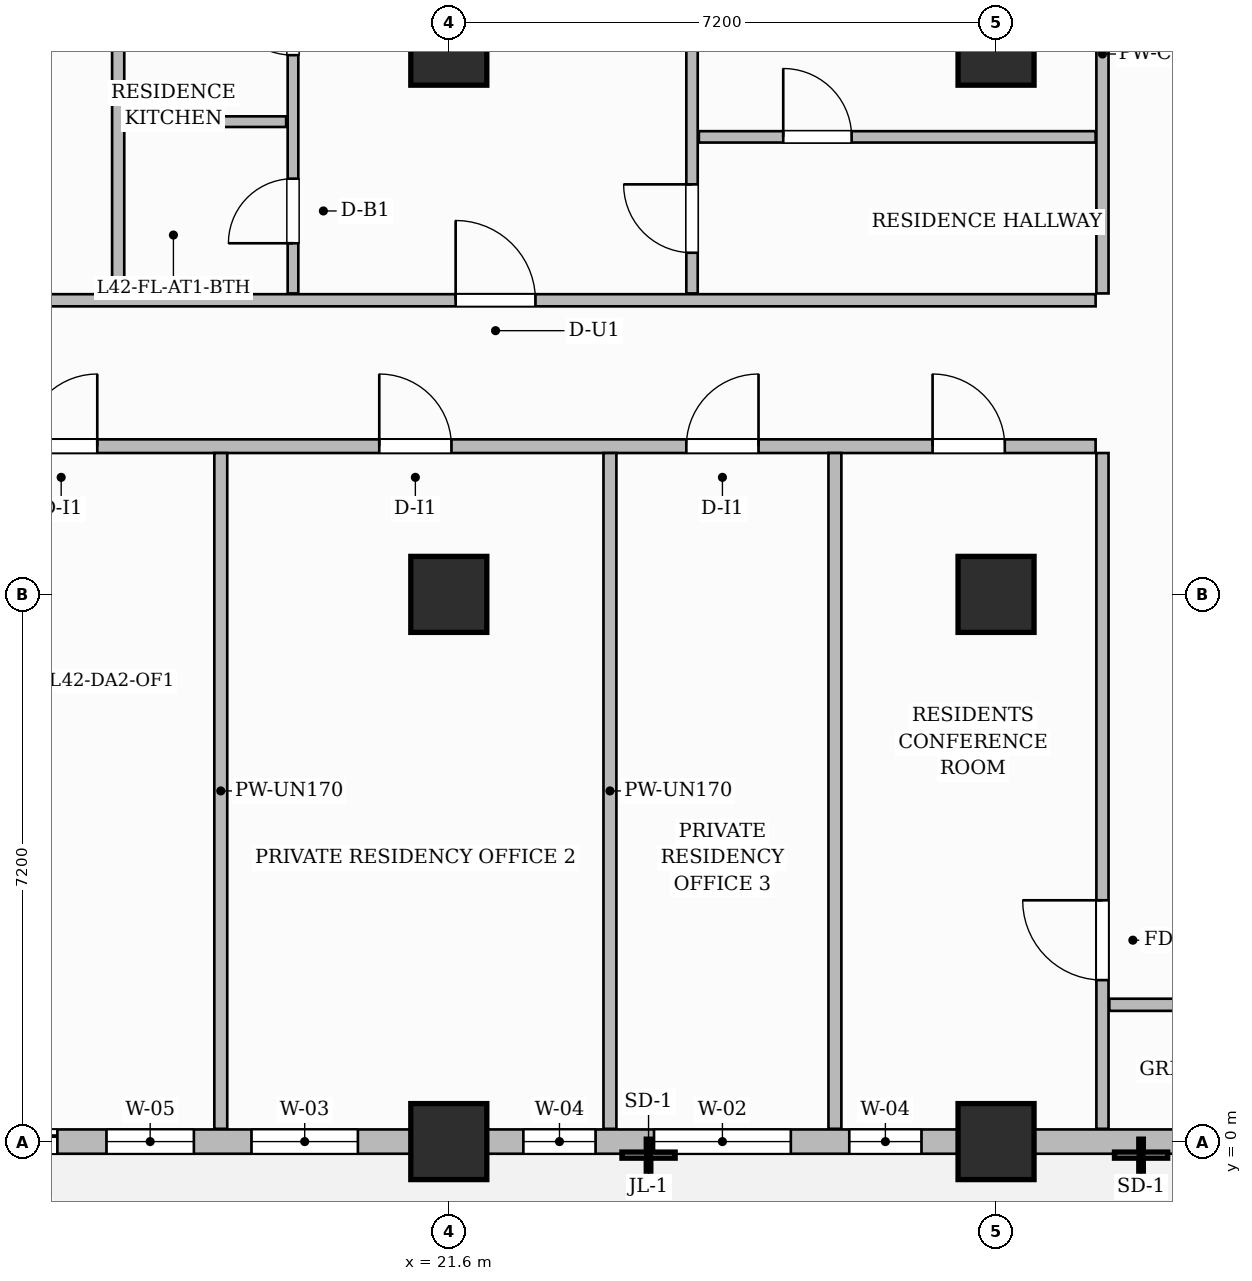
"""IFC4 building model, lengths in metres.
Left out: names, types, materials, properties, quantities, classifications, styles, units other than length and angle.
Written with IfcOpenShell. Run it as: python <this file> out.ifc"""

import sys

from ifc_helpers import new_model, si_unit, direction, frame, frame_2d, origin, origin_2d, place, context, subcontext, project, spatial, rectangle, extrude, source, transform, mapped, element, fill, save


model = new_model("IFC4")
c1 = context("Model", 3, precision=1e-05, world=origin(), true_north=direction((0.0, 1.0)))
c2 = subcontext(c1, "Body", "Model", "MODEL_VIEW")
j1 = project(units=[si_unit("LENGTHUNIT", "METRE"), si_unit("PLANEANGLEUNIT", "RADIAN")], contexts=[c1])
p1 = place(None, origin())
s1 = spatial("IfcSite", under=j1, at=p1, CompositionType="ELEMENT")
p2 = place(p1, origin())
s2 = spatial("IfcBuilding", under=s1, at=p2, CompositionType="ELEMENT")
p3 = place(p2, frame((0.0, 0.0, 169.55)))
s3 = spatial("IfcBuildingStorey", under=s2, at=p3, CompositionType="ELEMENT", Elevation=169.55)
m1 = source(origin(), c2, "Body", "SweptSolid", [
    extrude(rectangle(XDim=1.0, YDim=1.0, at=origin_2d()), origin(), (0.0, 0.0, 1.0), 3.85),
])
for number, where, z_axis, x_axis in (
    (1, (21.6, 0.0, 0.0), (0.0, 0.0, 1.0), (1.0, 0.0, 0.0)),
    (2, (21.6, 7.2, 0.0), (0.0, 0.0, 1.0), (1.0, 0.0, 0.0)),
    (3, (21.6, 14.4, 0.0), (0.0, 0.0, 1.0), (1.0, 0.0, 0.0)),
    (4, (28.8, 0.0, 0.0), (0.0, 0.0, 1.0), (1.0, 0.0, 0.0)),
    (5, (28.8, 7.2, 0.0), (0.0, 0.0, 1.0), (1.0, 0.0, 0.0)),
    (6, (28.8, 14.4, 0.0), (0.0, 0.0, 1.0), (1.0, 0.0, 0.0)),
):
    element("IfcColumn", number, at=place(p3, frame(where, z_axis=z_axis, x_axis=x_axis)), inside=s3, PredefinedType="COLUMN", context=c2, shape_type="MappedRepresentation", body=[
        mapped(m1, transform((0.0, 0.0, 0.0), scale=1.0)),
    ])
p4 = place(p3, frame((14.568, 9.15, 0.0), z_axis=(0.0, 0.0, 1.0), x_axis=(1.0, 0.0, 0.0)))
e7 = element("IfcWall", 7, at=p4, inside=s3, PredefinedType="PARTITIONING", context=c2, shape_type="SweptSolid", body=[
    extrude(rectangle(XDim=15.542, YDim=0.18, at=frame_2d((7.771, 0.0))), origin(), (0.0, 0.0, 1.0), 3.6),
])
p5 = place(p4, frame((1.457, 0.0, 0.0)))
e8 = element("IfcOpeningElement", 8, at=p5, cuts=e7, PredefinedType="OPENING", context=c2, shape_type="SweptSolid", body=[
    extrude(rectangle(XDim=0.95, YDim=2.15, at=frame_2d((0.475, 1.075))), frame((0.0, 0.1, 0.0), z_axis=(0.0, -1.0, 0.0), x_axis=(1.0, 0.0, 0.0)), (0.0, 0.0, 1.0), 0.2),
])
p6 = place(p4, frame((6.117, 0.0, 0.0)))
e9 = element("IfcOpeningElement", 9, at=p6, cuts=e7, PredefinedType="OPENING", context=c2, shape_type="SweptSolid", body=[
    extrude(rectangle(XDim=0.95, YDim=2.15, at=frame_2d((0.475, 1.075))), frame((0.0, 0.1, 0.0), z_axis=(0.0, -1.0, 0.0), x_axis=(1.0, 0.0, 0.0)), (0.0, 0.0, 1.0), 0.2),
])
p7 = place(p4, frame((10.157, 0.0, 0.0)))
e10 = element("IfcOpeningElement", 10, at=p7, cuts=e7, PredefinedType="OPENING", context=c2, shape_type="SweptSolid", body=[
    extrude(rectangle(XDim=0.95, YDim=2.15, at=frame_2d((0.475, 1.075))), frame((0.0, 0.1, 0.0), z_axis=(0.0, -1.0, 0.0), x_axis=(1.0, 0.0, 0.0)), (0.0, 0.0, 1.0), 0.2),
])
p8 = place(p4, frame((13.397, 0.0, 0.0)))
e11 = element("IfcOpeningElement", 11, at=p8, cuts=e7, PredefinedType="OPENING", context=c2, shape_type="SweptSolid", body=[
    extrude(rectangle(XDim=0.95, YDim=2.15, at=frame_2d((0.475, 1.075))), frame((0.0, 0.1, 0.0), z_axis=(0.0, -1.0, 0.0), x_axis=(1.0, 0.0, 0.0)), (0.0, 0.0, 1.0), 0.2),
])
p9 = place(p3, frame((14.568, 11.07, 0.0), z_axis=(0.0, 0.0, 1.0), x_axis=(1.0, 0.0, 0.0)))
e12 = element("IfcWall", 12, at=p9, inside=s3, PredefinedType="PARTITIONING", context=c2, shape_type="SweptSolid", body=[
    extrude(rectangle(XDim=15.542, YDim=0.16, at=frame_2d((7.771, 0.0))), origin(), (0.0, 0.0, 1.0), 3.6),
])
p10 = place(p9, frame((7.122, 0.0, 0.0)))
e13 = element("IfcOpeningElement", 13, at=p10, cuts=e12, PredefinedType="OPENING", context=c2, shape_type="SweptSolid", body=[
    extrude(rectangle(XDim=1.05, YDim=2.25, at=frame_2d((0.525, 1.125))), frame((0.0, 0.09, 0.0), z_axis=(0.0, -1.0, 0.0), x_axis=(1.0, 0.0, 0.0)), (0.0, 0.0, 1.0), 0.18),
])
p11 = place(p3, frame((30.2, 11.16, 0.0), z_axis=(0.0, 0.0, 1.0), x_axis=(0.0, 1.0, 0.0)))
e14 = element("IfcWall", 14, at=p11, inside=s3, PredefinedType="PARTITIONING", context=c2, shape_type="SweptSolid", body=[
    extrude(rectangle(XDim=6.3, YDim=0.16, at=frame_2d((3.15, 0.0))), origin(), (0.0, 0.0, 1.0), 3.6),
])
p12 = place(p3, frame((30.2, 0.168, 0.0), z_axis=(0.0, 0.0, 1.0), x_axis=(0.0, 1.0, 0.0)))
e15 = element("IfcWall", 15, at=p12, inside=s3, PredefinedType="PARTITIONING", context=c2, shape_type="SweptSolid", body=[
    extrude(rectangle(XDim=8.892, YDim=0.16, at=frame_2d((4.446, 0.0))), origin(), (0.0, 0.0, 1.0), 3.6),
])
p13 = place(p12, frame((1.957, 0.0, 0.0)))
e16 = element("IfcOpeningElement", 16, at=p13, cuts=e15, PredefinedType="OPENING", context=c2, shape_type="SweptSolid", body=[
    extrude(rectangle(XDim=1.05, YDim=2.15, at=frame_2d((0.525, 1.075))), frame((0.0, 0.09, 0.0), z_axis=(0.0, -1.0, 0.0), x_axis=(1.0, 0.0, 0.0)), (0.0, 0.0, 1.0), 0.18),
])
p14 = place(p3, frame((30.29, 1.8, 0.0), z_axis=(0.0, 0.0, 1.0), x_axis=(1.0, 0.0, 0.0)))
e17 = element("IfcWall", 17, at=p14, inside=s3, PredefinedType="PARTITIONING", context=c2, shape_type="SweptSolid", body=[
    extrude(rectangle(XDim=19.37, YDim=0.16, at=frame_2d((9.685, 0.0))), origin(), (0.0, 0.0, 1.0), 3.6),
])
p15 = place(p14, frame((2.916, 0.0, 0.0)))
e18 = element("IfcOpeningElement", 18, at=p15, cuts=e17, PredefinedType="OPENING", context=c2, shape_type="SweptSolid", body=[
    extrude(rectangle(XDim=0.9, YDim=2.15, at=frame_2d((0.45, 1.075))), frame((0.0, 0.09, 0.0), z_axis=(0.0, -1.0, 0.0), x_axis=(1.0, 0.0, 0.0)), (0.0, 0.0, 1.0), 0.18),
])
p16 = place(p14, frame((9.66, 0.0, 0.0)))
e19 = element("IfcOpeningElement", 19, at=p16, cuts=e17, PredefinedType="OPENING", context=c2, shape_type="SweptSolid", body=[
    extrude(rectangle(XDim=0.9, YDim=2.15, at=frame_2d((0.45, 1.075))), frame((0.0, 0.09, 0.0), z_axis=(0.0, -1.0, 0.0), x_axis=(1.0, 0.0, 0.0)), (0.0, 0.0, 1.0), 0.18),
])
p17 = place(p14, frame((15.86, 0.0, 0.0)))
e20 = element("IfcOpeningElement", 20, at=p17, cuts=e17, PredefinedType="OPENING", context=c2, shape_type="SweptSolid", body=[
    extrude(rectangle(XDim=0.9, YDim=2.15, at=frame_2d((0.45, 1.075))), frame((0.0, 0.09, 0.0), z_axis=(0.0, -1.0, 0.0), x_axis=(1.0, 0.0, 0.0)), (0.0, 0.0, 1.0), 0.18),
])
for number, where, z_axis, x_axis in (
    (21, (18.6, 0.168, 0.0), (0.0, 0.0, 1.0), (0.0, 1.0, 0.0)),
    (22, (23.72, 0.168, 0.0), (0.0, 0.0, 1.0), (0.0, 1.0, 0.0)),
    (23, (26.68, 0.168, 0.0), (0.0, 0.0, 1.0), (0.0, 1.0, 0.0)),
):
    element("IfcWall", number, at=place(p3, frame(where, z_axis=z_axis, x_axis=x_axis)), inside=s3, PredefinedType="PARTITIONING", context=c2, shape_type="SweptSolid", body=[
        extrude(rectangle(XDim=8.892, YDim=0.17, at=frame_2d((4.446, 0.0))), origin(), (0.0, 0.0, 1.0), 3.6),
    ])
p18 = place(p3, frame((17.25, 11.16, 0.0), z_axis=(0.0, 0.0, 1.0), x_axis=(0.0, 1.0, 0.0)))
e24 = element("IfcWall", 24, at=p18, inside=s3, PredefinedType="PARTITIONING", context=c2, shape_type="SweptSolid", body=[
    extrude(rectangle(XDim=13.95, YDim=0.16, at=frame_2d((6.975, 0.0))), origin(), (0.0, 0.0, 1.0), 3.6),
])
p19 = place(p3, frame((19.55, 11.16, 0.0), z_axis=(0.0, 0.0, 1.0), x_axis=(0.0, 1.0, 0.0)))
e25 = element("IfcWall", 25, at=p19, inside=s3, PredefinedType="PARTITIONING", context=c2, shape_type="SweptSolid", body=[
    extrude(rectangle(XDim=4.82, YDim=0.14, at=frame_2d((2.41, 0.0))), origin(), (0.0, 0.0, 1.0), 3.6),
])
p20 = place(p19, frame((0.66, 0.0, 0.0)))
e26 = element("IfcOpeningElement", 26, at=p20, cuts=e25, PredefinedType="OPENING", context=c2, shape_type="SweptSolid", body=[
    extrude(rectangle(XDim=0.85, YDim=2.1, at=frame_2d((0.425, 1.05))), frame((0.0, 0.08, 0.0), z_axis=(0.0, -1.0, 0.0), x_axis=(1.0, 0.0, 0.0)), (0.0, 0.0, 1.0), 0.16),
])
p21 = place(p19, frame((3.135, 0.0, 0.0)))
e27 = element("IfcOpeningElement", 27, at=p21, cuts=e25, PredefinedType="OPENING", context=c2, shape_type="SweptSolid", body=[
    extrude(rectangle(XDim=0.9, YDim=2.15, at=frame_2d((0.45, 1.075))), frame((0.0, 0.08, 0.0), z_axis=(0.0, -1.0, 0.0), x_axis=(1.0, 0.0, 0.0)), (0.0, 0.0, 1.0), 0.16),
])
p22 = place(p3, frame((17.39, 13.42, 0.0), z_axis=(0.0, 0.0, 1.0), x_axis=(1.0, 0.0, 0.0)))
e28 = element("IfcWall", 28, at=p22, inside=s3, PredefinedType="PARTITIONING", context=c2, shape_type="SweptSolid", body=[
    extrude(rectangle(XDim=2.07, YDim=0.14, at=frame_2d((1.035, 0.0))), origin(), (0.0, 0.0, 1.0), 3.6),
])
p23 = place(p3, frame((24.8, 11.16, 0.0), z_axis=(0.0, 0.0, 1.0), x_axis=(0.0, 1.0, 0.0)))
e29 = element("IfcWall", 29, at=p23, inside=s3, PredefinedType="PARTITIONING", context=c2, shape_type="SweptSolid", body=[
    extrude(rectangle(XDim=8.6, YDim=0.15, at=frame_2d((4.3, 0.0))), origin(), (0.0, 0.0, 1.0), 3.6),
])
p24 = place(p23, frame((0.535, 0.0, 0.0)))
e30 = element("IfcOpeningElement", 30, at=p24, cuts=e29, PredefinedType="OPENING", context=c2, shape_type="SweptSolid", body=[
    extrude(rectangle(XDim=0.9, YDim=2.15, at=frame_2d((0.45, 1.075))), frame((0.0, 0.085, 0.0), z_axis=(0.0, -1.0, 0.0), x_axis=(1.0, 0.0, 0.0)), (0.0, 0.0, 1.0), 0.17),
])
p25 = place(p3, frame((24.89, 13.22, 0.0), z_axis=(0.0, 0.0, 1.0), x_axis=(1.0, 0.0, 0.0)))
e31 = element("IfcWall", 31, at=p25, inside=s3, PredefinedType="PARTITIONING", context=c2, shape_type="SweptSolid", body=[
    extrude(rectangle(XDim=5.22, YDim=0.15, at=frame_2d((2.61, 0.0))), origin(), (0.0, 0.0, 1.0), 3.6),
])
p26 = place(p25, frame((1.11, 0.0, 0.0)))
e32 = element("IfcOpeningElement", 32, at=p26, cuts=e31, PredefinedType="OPENING", context=c2, shape_type="SweptSolid", body=[
    extrude(rectangle(XDim=0.9, YDim=2.15, at=frame_2d((0.45, 1.075))), frame((0.0, 0.085, 0.0), z_axis=(0.0, -1.0, 0.0), x_axis=(1.0, 0.0, 0.0)), (0.0, 0.0, 1.0), 0.17),
])
p27 = place(p3, frame((14.4, 0.0, 0.0), z_axis=(0.0, 0.0, 1.0), x_axis=(1.0, 0.0, 0.0)))
e33 = element("IfcWall", 33, at=p27, inside=s3, PredefinedType="SOLIDWALL", context=c2, shape_type="SweptSolid", body=[
    extrude(rectangle(XDim=35.4, YDim=0.32, at=frame_2d((17.7, 0.0))), origin(), (0.0, 0.0, 1.0), 3.085),
])
p28 = place(p27, frame((0.85, 0.0, 0.0)))
e34 = element("IfcOpeningElement", 34, at=p28, cuts=e33, PredefinedType="OPENING", context=c2, shape_type="SweptSolid", body=[
    extrude(rectangle(XDim=1.2, YDim=2.2, at=frame_2d((0.6, 1.1))), frame((0.0, 0.17, 0.0), z_axis=(0.0, -1.0, 0.0), x_axis=(1.0, 0.0, 0.0)), (0.0, 0.0, 1.0), 0.34),
])
p29 = place(p27, frame((2.696, 0.0, 0.8)))
e35 = element("IfcOpeningElement", 35, at=p29, cuts=e33, PredefinedType="OPENING", context=c2, shape_type="SweptSolid", body=[
    extrude(rectangle(XDim=1.15, YDim=1.8, at=frame_2d((0.575, 0.9))), frame((0.0, 0.17, 0.0), z_axis=(0.0, -1.0, 0.0), x_axis=(1.0, 0.0, 0.0)), (0.0, 0.0, 1.0), 0.34),
])
p30 = place(p27, frame((4.604, 0.0, 0.8)))
e36 = element("IfcOpeningElement", 36, at=p30, cuts=e33, PredefinedType="OPENING", context=c2, shape_type="SweptSolid", body=[
    extrude(rectangle(XDim=1.4, YDim=1.85, at=frame_2d((0.7, 0.925))), frame((0.0, 0.17, 0.0), z_axis=(0.0, -1.0, 0.0), x_axis=(1.0, 0.0, 0.0)), (0.0, 0.0, 1.0), 0.34),
])
p31 = place(p27, frame((8.181, 0.0, 0.8)))
e37 = element("IfcOpeningElement", 37, at=p31, cuts=e33, PredefinedType="OPENING", context=c2, shape_type="SweptSolid", body=[
    extrude(rectangle(XDim=0.95, YDim=1.75, at=frame_2d((0.475, 0.875))), frame((0.0, 0.17, 0.0), z_axis=(0.0, -1.0, 0.0), x_axis=(1.0, 0.0, 0.0)), (0.0, 0.0, 1.0), 0.34),
])
p32 = place(p27, frame((9.9, 0.0, 0.8)))
e38 = element("IfcOpeningElement", 38, at=p32, cuts=e33, PredefinedType="OPENING", context=c2, shape_type="SweptSolid", body=[
    extrude(rectangle(XDim=1.8, YDim=1.85, at=frame_2d((0.9, 0.925))), frame((0.0, 0.17, 0.0), z_axis=(0.0, -1.0, 0.0), x_axis=(1.0, 0.0, 0.0)), (0.0, 0.0, 1.0), 0.34),
])
p33 = place(p27, frame((12.469, 0.0, 0.8)))
e39 = element("IfcOpeningElement", 39, at=p33, cuts=e33, PredefinedType="OPENING", context=c2, shape_type="SweptSolid", body=[
    extrude(rectangle(XDim=0.95, YDim=1.75, at=frame_2d((0.475, 0.875))), frame((0.0, 0.17, 0.0), z_axis=(0.0, -1.0, 0.0), x_axis=(1.0, 0.0, 0.0)), (0.0, 0.0, 1.0), 0.34),
])
p34 = place(p27, frame((16.804, 0.0, 0.8)))
e40 = element("IfcOpeningElement", 40, at=p34, cuts=e33, PredefinedType="OPENING", context=c2, shape_type="SweptSolid", body=[
    extrude(rectangle(XDim=1.8, YDim=1.85, at=frame_2d((0.9, 0.925))), frame((0.0, 0.17, 0.0), z_axis=(0.0, -1.0, 0.0), x_axis=(1.0, 0.0, 0.0)), (0.0, 0.0, 1.0), 0.34),
])
p35 = place(p27, frame((21.521, 0.0, 0.8)))
e41 = element("IfcOpeningElement", 41, at=p35, cuts=e33, PredefinedType="OPENING", context=c2, shape_type="SweptSolid", body=[
    extrude(rectangle(XDim=0.95, YDim=1.75, at=frame_2d((0.475, 0.875))), frame((0.0, 0.17, 0.0), z_axis=(0.0, -1.0, 0.0), x_axis=(1.0, 0.0, 0.0)), (0.0, 0.0, 1.0), 0.34),
])
p36 = place(p27, frame((23.904, 0.0, 0.8)))
e42 = element("IfcOpeningElement", 42, at=p36, cuts=e33, PredefinedType="OPENING", context=c2, shape_type="SweptSolid", body=[
    extrude(rectangle(XDim=1.8, YDim=1.85, at=frame_2d((0.9, 0.925))), frame((0.0, 0.17, 0.0), z_axis=(0.0, -1.0, 0.0), x_axis=(1.0, 0.0, 0.0)), (0.0, 0.0, 1.0), 0.34),
])
p37 = place(p27, frame((29.681, 0.0, 0.8)))
e43 = element("IfcOpeningElement", 43, at=p37, cuts=e33, PredefinedType="OPENING", context=c2, shape_type="SweptSolid", body=[
    extrude(rectangle(XDim=1.8, YDim=1.85, at=frame_2d((0.9, 0.925))), frame((0.0, 0.17, 0.0), z_axis=(0.0, -1.0, 0.0), x_axis=(1.0, 0.0, 0.0)), (0.0, 0.0, 1.0), 0.34),
])
p38 = place(p27, frame((32.327, 0.0, 0.8)))
e44 = element("IfcOpeningElement", 44, at=p38, cuts=e33, PredefinedType="OPENING", context=c2, shape_type="SweptSolid", body=[
    extrude(rectangle(XDim=1.8, YDim=1.85, at=frame_2d((0.9, 0.925))), frame((0.0, 0.17, 0.0), z_axis=(0.0, -1.0, 0.0), x_axis=(1.0, 0.0, 0.0)), (0.0, 0.0, 1.0), 0.34),
])
m2 = source(origin(), c2, "Body", "SweptSolid", [
    extrude(rectangle(XDim=1.05, YDim=2.15, at=frame_2d((0.525, 1.075))), frame((0.0, 0.025, 0.0), z_axis=(0.0, -1.0, 0.0), x_axis=(1.0, 0.0, 0.0)), (0.0, 0.0, 1.0), 0.05),
])
p39 = place(p13, origin())
e45 = element("IfcDoor", 45, at=p39, inside=s3, OperationType="SINGLE_SWING_RIGHT", PredefinedType="DOOR", context=c2, shape_type="MappedRepresentation", body=[
    mapped(m2, transform((0.0, 0.0, 0.0), scale=1.0)),
])
fill(e16, e45)
m3 = source(origin(), c2, "Body", "SweptSolid", [
    extrude(rectangle(XDim=0.95, YDim=2.15, at=frame_2d((0.475, 1.075))), frame((0.0, 0.025, 0.0), z_axis=(0.0, -1.0, 0.0), x_axis=(1.0, 0.0, 0.0)), (0.0, 0.0, 1.0), 0.05),
])
p40 = place(p5, origin())
e46 = element("IfcDoor", 46, at=p40, inside=s3, OperationType="SINGLE_SWING_RIGHT", PredefinedType="DOOR", context=c2, shape_type="MappedRepresentation", body=[
    mapped(m3, transform((0.0, 0.0, 0.0), scale=1.0)),
])
fill(e8, e46)
p41 = place(p6, origin())
e47 = element("IfcDoor", 47, at=p41, inside=s3, OperationType="SINGLE_SWING_LEFT", PredefinedType="DOOR", context=c2, shape_type="MappedRepresentation", body=[
    mapped(m3, transform((0.0, 0.0, 0.0), scale=1.0)),
])
fill(e9, e47)
p42 = place(p7, origin())
e48 = element("IfcDoor", 48, at=p42, inside=s3, OperationType="SINGLE_SWING_RIGHT", PredefinedType="DOOR", context=c2, shape_type="MappedRepresentation", body=[
    mapped(m3, transform((0.0, 0.0, 0.0), scale=1.0)),
])
fill(e10, e48)
p43 = place(p8, origin())
e49 = element("IfcDoor", 49, at=p43, inside=s3, OperationType="SINGLE_SWING_LEFT", PredefinedType="DOOR", context=c2, shape_type="MappedRepresentation", body=[
    mapped(m3, transform((0.0, 0.0, 0.0), scale=1.0)),
])
fill(e11, e49)
m4 = source(origin(), c2, "Body", "SweptSolid", [
    extrude(rectangle(XDim=0.85, YDim=2.1, at=frame_2d((0.425, 1.05))), frame((0.0, 0.025, 0.0), z_axis=(0.0, -1.0, 0.0), x_axis=(1.0, 0.0, 0.0)), (0.0, 0.0, 1.0), 0.05),
])
p44 = place(p20, origin())
e50 = element("IfcDoor", 50, at=p44, inside=s3, OperationType="SINGLE_SWING_LEFT", PredefinedType="DOOR", context=c2, shape_type="MappedRepresentation", body=[
    mapped(m4, transform((0.0, 0.0, 0.0), scale=1.0)),
])
fill(e26, e50)
m5 = source(origin(), c2, "Body", "SweptSolid", [
    extrude(rectangle(XDim=0.9, YDim=2.15, at=frame_2d((0.45, 1.075))), frame((0.0, 0.025, 0.0), z_axis=(0.0, -1.0, 0.0), x_axis=(1.0, 0.0, 0.0)), (0.0, 0.0, 1.0), 0.05),
])
p45 = place(p21, origin())
e51 = element("IfcDoor", 51, at=p45, inside=s3, OperationType="SINGLE_SWING_RIGHT", PredefinedType="DOOR", context=c2, shape_type="MappedRepresentation", body=[
    mapped(m5, transform((0.0, 0.0, 0.0), scale=1.0)),
])
fill(e27, e51)
m6 = source(origin(), c2, "Body", "SweptSolid", [
    extrude(rectangle(XDim=1.05, YDim=2.25, at=frame_2d((0.525, 1.125))), frame((0.0, 0.025, 0.0), z_axis=(0.0, -1.0, 0.0), x_axis=(1.0, 0.0, 0.0)), (0.0, 0.0, 1.0), 0.05),
])
p46 = place(p10, origin())
e52 = element("IfcDoor", 52, at=p46, inside=s3, OperationType="SINGLE_SWING_LEFT", PredefinedType="DOOR", context=c2, shape_type="MappedRepresentation", body=[
    mapped(m6, transform((0.0, 0.0, 0.0), scale=1.0)),
])
fill(e13, e52)
p47 = place(p24, origin())
e53 = element("IfcDoor", 53, at=p47, inside=s3, OperationType="SINGLE_SWING_RIGHT", PredefinedType="DOOR", context=c2, shape_type="MappedRepresentation", body=[
    mapped(m5, transform((0.0, 0.0, 0.0), scale=1.0)),
])
fill(e30, e53)
p48 = place(p26, origin())
e54 = element("IfcDoor", 54, at=p48, inside=s3, OperationType="SINGLE_SWING_LEFT", PredefinedType="DOOR", context=c2, shape_type="MappedRepresentation", body=[
    mapped(m5, transform((0.0, 0.0, 0.0), scale=1.0)),
])
fill(e32, e54)
m7 = source(origin(), c2, "Body", "SweptSolid", [
    extrude(rectangle(XDim=1.2, YDim=2.2, at=frame_2d((0.6, 1.1))), frame((0.0, 0.025, 0.0), z_axis=(0.0, -1.0, 0.0), x_axis=(1.0, 0.0, 0.0)), (0.0, 0.0, 1.0), 0.05),
])
p49 = place(p28, origin())
e55 = element("IfcDoor", 55, at=p49, inside=s3, OperationType="SLIDING_TO_LEFT", PredefinedType="DOOR", context=c2, shape_type="MappedRepresentation", body=[
    mapped(m7, transform((0.0, 0.0, 0.0), scale=1.0)),
])
fill(e34, e55)
m8 = source(origin(), c2, "Body", "SweptSolid", [
    extrude(rectangle(XDim=1.15, YDim=1.8, at=frame_2d((0.575, 0.9))), frame((0.0, 0.03, 0.0), z_axis=(0.0, -1.0, 0.0), x_axis=(1.0, 0.0, 0.0)), (0.0, 0.0, 1.0), 0.06),
])
p50 = place(p29, origin())
e56 = element("IfcWindow", 56, at=p50, inside=s3, PartitioningType="SINGLE_PANEL", PredefinedType="WINDOW", context=c2, shape_type="MappedRepresentation", body=[
    mapped(m8, transform((0.0, 0.0, 0.0), scale=1.0)),
])
fill(e35, e56)
m9 = source(origin(), c2, "Body", "SweptSolid", [
    extrude(rectangle(XDim=1.4, YDim=1.85, at=frame_2d((0.7, 0.925))), frame((0.0, 0.03, 0.0), z_axis=(0.0, -1.0, 0.0), x_axis=(1.0, 0.0, 0.0)), (0.0, 0.0, 1.0), 0.06),
])
p51 = place(p30, origin())
e57 = element("IfcWindow", 57, at=p51, inside=s3, PartitioningType="SINGLE_PANEL", PredefinedType="WINDOW", context=c2, shape_type="MappedRepresentation", body=[
    mapped(m9, transform((0.0, 0.0, 0.0), scale=1.0)),
])
fill(e36, e57)
m10 = source(origin(), c2, "Body", "SweptSolid", [
    extrude(rectangle(XDim=0.95, YDim=1.75, at=frame_2d((0.475, 0.875))), frame((0.0, 0.03, 0.0), z_axis=(0.0, -1.0, 0.0), x_axis=(1.0, 0.0, 0.0)), (0.0, 0.0, 1.0), 0.06),
])
p52 = place(p31, origin())
e58 = element("IfcWindow", 58, at=p52, inside=s3, PartitioningType="SINGLE_PANEL", PredefinedType="WINDOW", context=c2, shape_type="MappedRepresentation", body=[
    mapped(m10, transform((0.0, 0.0, 0.0), scale=1.0)),
])
fill(e37, e58)
m11 = source(origin(), c2, "Body", "SweptSolid", [
    extrude(rectangle(XDim=1.8, YDim=1.85, at=frame_2d((0.9, 0.925))), frame((0.0, 0.03, 0.0), z_axis=(0.0, -1.0, 0.0), x_axis=(1.0, 0.0, 0.0)), (0.0, 0.0, 1.0), 0.06),
])
p53 = place(p32, origin())
e59 = element("IfcWindow", 59, at=p53, inside=s3, PartitioningType="DOUBLE_PANEL_VERTICAL", PredefinedType="WINDOW", context=c2, shape_type="MappedRepresentation", body=[
    mapped(m11, transform((0.0, 0.0, 0.0), scale=1.0)),
])
fill(e38, e59)
p54 = place(p33, origin())
e60 = element("IfcWindow", 60, at=p54, inside=s3, PartitioningType="SINGLE_PANEL", PredefinedType="WINDOW", context=c2, shape_type="MappedRepresentation", body=[
    mapped(m10, transform((0.0, 0.0, 0.0), scale=1.0)),
])
fill(e39, e60)
save(model, sys.argv[1])
